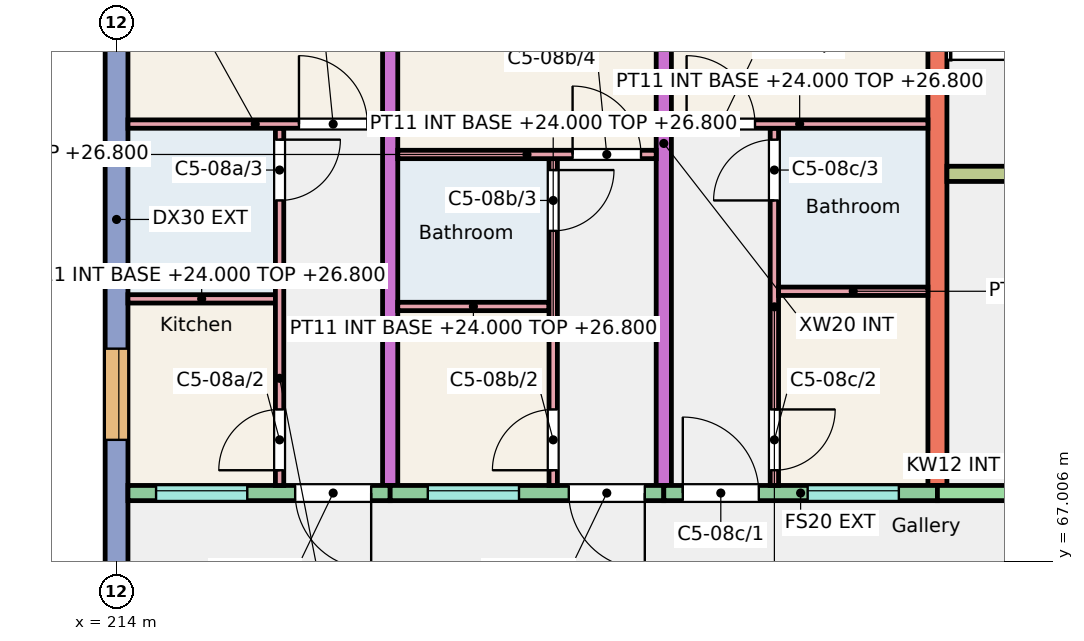
"""IFC4 building model, lengths in metres.
Left out: names, types, materials, properties, quantities, classifications, styles, units other than length and angle.
Written with IfcOpenShell. Run it as: python <this file> out.ifc"""

import sys

from ifc_helpers import new_model, si_unit, direction, frame, frame_2d, origin, place, context, subcontext, project, spatial, rectangle, extrude, element, fill, save


model = new_model("IFC4")
c1 = context("Model", 3, precision=1e-05, world=origin(), true_north=direction((0.0, 1.0)))
c2 = subcontext(c1, "Body", "Model", "MODEL_VIEW")
j1 = project(units=[si_unit("LENGTHUNIT", "METRE"), si_unit("PLANEANGLEUNIT", "RADIAN")], contexts=[c1])
p1 = place(None, origin())
s1 = spatial("IfcSite", under=j1, at=p1, CompositionType="ELEMENT")
p2 = place(p1, origin())
s2 = spatial("IfcBuilding", under=s1, at=p2, CompositionType="ELEMENT")
p3 = place(p2, frame((0.0, 0.0, 24.0)))
s3 = spatial("IfcBuildingStorey", under=s2, at=p3, CompositionType="ELEMENT", Elevation=24.0)
p4 = place(p3, frame((214.0, 66.0, 0.0), z_axis=(0.0, 0.0, 1.0), x_axis=(0.0, 1.0, 0.0)))
e1 = element("IfcWall", 1, at=p4, inside=s3, PredefinedType="SHEAR", context=c2, shape_type="SweptSolid", body=[
    extrude(rectangle(XDim=11.0, YDim=0.3, at=frame_2d((5.5, 0.0))), origin(), (0.0, 0.0, 1.0), 3.0),
])
p5 = place(p4, frame((2.6, 0.0, 0.9)))
e2 = element("IfcOpeningElement", 2, at=p5, cuts=e1, PredefinedType="OPENING", context=c2, shape_type="SweptSolid", body=[
    extrude(rectangle(XDim=1.2, YDim=1.5, at=frame_2d((0.6, 0.75))), frame((0.0, 0.16, 0.0), z_axis=(0.0, -1.0, 0.0), x_axis=(1.0, 0.0, 0.0)), (0.0, 0.0, 1.0), 0.32),
])
p6 = place(p4, frame((8.005, 0.0, 0.9)))
e3 = element("IfcOpeningElement", 3, at=p6, cuts=e1, PredefinedType="OPENING", context=c2, shape_type="SweptSolid", body=[
    extrude(rectangle(XDim=1.8, YDim=1.5, at=frame_2d((0.9, 0.75))), frame((0.0, 0.16, 0.0), z_axis=(0.0, -1.0, 0.0), x_axis=(1.0, 0.0, 0.0)), (0.0, 0.0, 1.0), 0.32),
])
for number, where, z_axis, x_axis in (
    (4, (217.6, 68.0, 0.0), (0.0, 0.0, 1.0), (0.0, 1.0, 0.0)),
    (5, (221.2, 68.0, 0.0), (0.0, 0.0, 1.0), (0.0, 1.0, 0.0)),
):
    element("IfcWall", number, at=place(p3, frame(where, z_axis=z_axis, x_axis=x_axis)), inside=s3, PredefinedType="SHEAR", context=c2, shape_type="SweptSolid", body=[
        extrude(rectangle(XDim=9.0, YDim=0.2, at=frame_2d((4.5, 0.0))), origin(), (0.0, 0.0, 1.0), 3.0),
    ])
p7 = place(p3, frame((224.8, 68.0, 0.0), z_axis=(0.0, 0.0, 1.0), x_axis=(0.0, 1.0, 0.0)))
e6 = element("IfcWall", 6, at=p7, inside=s3, PredefinedType="SHEAR", context=c2, shape_type="SweptSolid", body=[
    extrude(rectangle(XDim=9.0, YDim=0.25, at=frame_2d((4.5, 0.0))), origin(), (0.0, 0.0, 1.0), 3.0),
])
p8 = place(p3, frame((214.15, 67.9, 0.0), z_axis=(0.0, 0.0, 1.0), x_axis=(1.0, 0.0, 0.0)))
e7 = element("IfcWall", 7, at=p8, inside=s3, PredefinedType="SOLIDWALL", context=c2, shape_type="SweptSolid", body=[
    extrude(rectangle(XDim=3.45, YDim=0.2, at=frame_2d((1.725, 0.0))), origin(), (0.0, 0.0, 1.0), 3.0),
])
p9 = place(p8, frame((0.37, 0.0, 1.1)))
e8 = element("IfcOpeningElement", 8, at=p9, cuts=e7, PredefinedType="OPENING", context=c2, shape_type="SweptSolid", body=[
    extrude(rectangle(XDim=1.2, YDim=1.3, at=frame_2d((0.6, 0.65))), frame((0.0, 0.11, 0.0), z_axis=(0.0, -1.0, 0.0), x_axis=(1.0, 0.0, 0.0)), (0.0, 0.0, 1.0), 0.22),
])
p10 = place(p8, frame((2.2, 0.0, 0.0)))
e9 = element("IfcOpeningElement", 9, at=p10, cuts=e7, PredefinedType="OPENING", context=c2, shape_type="SweptSolid", body=[
    extrude(rectangle(XDim=1.0, YDim=2.1, at=frame_2d((0.5, 1.05))), frame((0.0, 0.11, 0.0), z_axis=(0.0, -1.0, 0.0), x_axis=(1.0, 0.0, 0.0)), (0.0, 0.0, 1.0), 0.22),
])
p11 = place(p3, frame((217.6, 67.9, 0.0), z_axis=(0.0, 0.0, 1.0), x_axis=(1.0, 0.0, 0.0)))
e10 = element("IfcWall", 10, at=p11, inside=s3, PredefinedType="SOLIDWALL", context=c2, shape_type="SweptSolid", body=[
    extrude(rectangle(XDim=3.6, YDim=0.2, at=frame_2d((1.8, 0.0))), origin(), (0.0, 0.0, 1.0), 3.0),
])
p12 = place(p11, frame((0.495, 0.0, 1.1)))
e11 = element("IfcOpeningElement", 11, at=p12, cuts=e10, PredefinedType="OPENING", context=c2, shape_type="SweptSolid", body=[
    extrude(rectangle(XDim=1.2, YDim=1.3, at=frame_2d((0.6, 0.65))), frame((0.0, 0.11, 0.0), z_axis=(0.0, -1.0, 0.0), x_axis=(1.0, 0.0, 0.0)), (0.0, 0.0, 1.0), 0.22),
])
p13 = place(p11, frame((2.35, 0.0, 0.0)))
e12 = element("IfcOpeningElement", 12, at=p13, cuts=e10, PredefinedType="OPENING", context=c2, shape_type="SweptSolid", body=[
    extrude(rectangle(XDim=1.0, YDim=2.1, at=frame_2d((0.5, 1.05))), frame((0.0, 0.11, 0.0), z_axis=(0.0, -1.0, 0.0), x_axis=(1.0, 0.0, 0.0)), (0.0, 0.0, 1.0), 0.22),
])
p14 = place(p3, frame((221.2, 67.9, 0.0), z_axis=(0.0, 0.0, 1.0), x_axis=(1.0, 0.0, 0.0)))
e13 = element("IfcWall", 13, at=p14, inside=s3, PredefinedType="SOLIDWALL", context=c2, shape_type="SweptSolid", body=[
    extrude(rectangle(XDim=3.6, YDim=0.2, at=frame_2d((1.8, 0.0))), origin(), (0.0, 0.0, 1.0), 3.0),
])
p15 = place(p14, frame((1.893, 0.0, 1.1)))
e14 = element("IfcOpeningElement", 14, at=p15, cuts=e13, PredefinedType="OPENING", context=c2, shape_type="SweptSolid", body=[
    extrude(rectangle(XDim=1.2, YDim=1.3, at=frame_2d((0.6, 0.65))), frame((0.0, 0.11, 0.0), z_axis=(0.0, -1.0, 0.0), x_axis=(1.0, 0.0, 0.0)), (0.0, 0.0, 1.0), 0.22),
])
p16 = place(p14, frame((0.25, 0.0, 0.0)))
e15 = element("IfcOpeningElement", 15, at=p16, cuts=e13, PredefinedType="OPENING", context=c2, shape_type="SweptSolid", body=[
    extrude(rectangle(XDim=1.0, YDim=2.1, at=frame_2d((0.5, 1.05))), frame((0.0, 0.11, 0.0), z_axis=(0.0, -1.0, 0.0), x_axis=(1.0, 0.0, 0.0)), (0.0, 0.0, 1.0), 0.22),
])
p17 = place(p3, frame((224.8, 67.9, 0.0), z_axis=(0.0, 0.0, 1.0), x_axis=(1.0, 0.0, 0.0)))
e16 = element("IfcWall", 16, at=p17, inside=s3, PredefinedType="SHEAR", context=c2, shape_type="SweptSolid", body=[
    extrude(rectangle(XDim=5.85, YDim=0.2, at=frame_2d((2.925, 0.0))), origin(), (0.0, 0.0, 1.0), 3.0),
])
p18 = place(p17, frame((2.438, 0.0, 0.0)))
e17 = element("IfcOpeningElement", 17, at=p18, cuts=e16, PredefinedType="OPENING", context=c2, shape_type="SweptSolid", body=[
    extrude(rectangle(XDim=1.1, YDim=2.1, at=frame_2d((0.55, 1.05))), frame((0.0, 0.11, 0.0), z_axis=(0.0, -1.0, 0.0), x_axis=(1.0, 0.0, 0.0)), (0.0, 0.0, 1.0), 0.22),
])
p19 = place(p3, frame((224.925, 72.1, 0.0), z_axis=(0.0, 0.0, 1.0), x_axis=(1.0, 0.0, 0.0)))
e18 = element("IfcWall", 18, at=p19, inside=s3, PredefinedType="SHEAR", context=c2, shape_type="SweptSolid", body=[
    extrude(rectangle(XDim=5.725, YDim=0.2, at=frame_2d((2.862, 0.0))), origin(), (0.0, 0.0, 1.0), 3.0),
])
p20 = place(p19, frame((0.95, 0.0, 0.0)))
e19 = element("IfcOpeningElement", 19, at=p20, cuts=e18, PredefinedType="OPENING", context=c2, shape_type="SweptSolid", body=[
    extrude(rectangle(XDim=1.0, YDim=2.1, at=frame_2d((0.5, 1.05))), frame((0.0, 0.11, 0.0), z_axis=(0.0, -1.0, 0.0), x_axis=(1.0, 0.0, 0.0)), (0.0, 0.0, 1.0), 0.22),
])
p21 = place(p19, frame((3.863, 0.0, 0.0)))
e20 = element("IfcOpeningElement", 20, at=p21, cuts=e18, PredefinedType="OPENING", context=c2, shape_type="SweptSolid", body=[
    extrude(rectangle(XDim=1.1, YDim=2.1, at=frame_2d((0.55, 1.05))), frame((0.0, 0.11, 0.0), z_axis=(0.0, -1.0, 0.0), x_axis=(1.0, 0.0, 0.0)), (0.0, 0.0, 1.0), 0.22),
])
p22 = place(p3, frame((214.15, 70.455, 0.0), z_axis=(0.0, 0.0, 1.0), x_axis=(1.0, 0.0, 0.0)))
e21 = element("IfcWall", 21, at=p22, inside=s3, PredefinedType="PARTITIONING", context=c2, shape_type="SweptSolid", body=[
    extrude(rectangle(XDim=1.94, YDim=0.11, at=frame_2d((0.97, 0.0))), origin(), (0.0, 0.0, 1.0), 2.8),
])
p23 = place(p3, frame((216.145, 68.0, 0.0), z_axis=(0.0, 0.0, 1.0), x_axis=(0.0, 1.0, 0.0)))
e22 = element("IfcWall", 22, at=p23, inside=s3, PredefinedType="PARTITIONING", context=c2, shape_type="SweptSolid", body=[
    extrude(rectangle(XDim=4.7, YDim=0.11, at=frame_2d((2.35, 0.0))), origin(), (0.0, 0.0, 1.0), 2.8),
])
p24 = place(p23, frame((0.2, 0.0, 0.0)))
e23 = element("IfcOpeningElement", 23, at=p24, cuts=e22, PredefinedType="OPENING", context=c2, shape_type="SweptSolid", body=[
    extrude(rectangle(XDim=0.8, YDim=2.1, at=frame_2d((0.4, 1.05))), frame((0.0, 0.065, 0.0), z_axis=(0.0, -1.0, 0.0), x_axis=(1.0, 0.0, 0.0)), (0.0, 0.0, 1.0), 0.13),
])
p25 = place(p23, frame((3.75, 0.0, 0.0)))
e24 = element("IfcOpeningElement", 24, at=p25, cuts=e22, PredefinedType="OPENING", context=c2, shape_type="SweptSolid", body=[
    extrude(rectangle(XDim=0.8, YDim=2.1, at=frame_2d((0.4, 1.05))), frame((0.0, 0.065, 0.0), z_axis=(0.0, -1.0, 0.0), x_axis=(1.0, 0.0, 0.0)), (0.0, 0.0, 1.0), 0.13),
])
p26 = place(p3, frame((214.15, 72.755, 0.0), z_axis=(0.0, 0.0, 1.0), x_axis=(1.0, 0.0, 0.0)))
e25 = element("IfcWall", 25, at=p26, inside=s3, PredefinedType="PARTITIONING", context=c2, shape_type="SweptSolid", body=[
    extrude(rectangle(XDim=3.35, YDim=0.11, at=frame_2d((1.675, 0.0))), origin(), (0.0, 0.0, 1.0), 2.8),
])
p27 = place(p26, frame((2.25, 0.0, 0.0)))
e26 = element("IfcOpeningElement", 26, at=p27, cuts=e25, PredefinedType="OPENING", context=c2, shape_type="SweptSolid", body=[
    extrude(rectangle(XDim=0.9, YDim=2.1, at=frame_2d((0.45, 1.05))), frame((0.0, 0.065, 0.0), z_axis=(0.0, -1.0, 0.0), x_axis=(1.0, 0.0, 0.0)), (0.0, 0.0, 1.0), 0.13),
])
p28 = place(p3, frame((217.7, 70.355, 0.0), z_axis=(0.0, 0.0, 1.0), x_axis=(1.0, 0.0, 0.0)))
e27 = element("IfcWall", 27, at=p28, inside=s3, PredefinedType="PARTITIONING", context=c2, shape_type="SweptSolid", body=[
    extrude(rectangle(XDim=1.99, YDim=0.11, at=frame_2d((0.995, 0.0))), origin(), (0.0, 0.0, 1.0), 2.8),
])
p29 = place(p3, frame((219.745, 68.0, 0.0), z_axis=(0.0, 0.0, 1.0), x_axis=(0.0, 1.0, 0.0)))
e28 = element("IfcWall", 28, at=p29, inside=s3, PredefinedType="PARTITIONING", context=c2, shape_type="SweptSolid", body=[
    extrude(rectangle(XDim=4.3, YDim=0.11, at=frame_2d((2.15, 0.0))), origin(), (0.0, 0.0, 1.0), 2.8),
])
p30 = place(p29, frame((0.2, 0.0, 0.0)))
e29 = element("IfcOpeningElement", 29, at=p30, cuts=e28, PredefinedType="OPENING", context=c2, shape_type="SweptSolid", body=[
    extrude(rectangle(XDim=0.8, YDim=2.1, at=frame_2d((0.4, 1.05))), frame((0.0, 0.065, 0.0), z_axis=(0.0, -1.0, 0.0), x_axis=(1.0, 0.0, 0.0)), (0.0, 0.0, 1.0), 0.13),
])
p31 = place(p29, frame((3.35, 0.0, 0.0)))
e30 = element("IfcOpeningElement", 30, at=p31, cuts=e28, PredefinedType="OPENING", context=c2, shape_type="SweptSolid", body=[
    extrude(rectangle(XDim=0.8, YDim=2.1, at=frame_2d((0.4, 1.05))), frame((0.0, 0.065, 0.0), z_axis=(0.0, -1.0, 0.0), x_axis=(1.0, 0.0, 0.0)), (0.0, 0.0, 1.0), 0.13),
])
p32 = place(p3, frame((217.7, 72.355, 0.0), z_axis=(0.0, 0.0, 1.0), x_axis=(1.0, 0.0, 0.0)))
e31 = element("IfcWall", 31, at=p32, inside=s3, PredefinedType="PARTITIONING", context=c2, shape_type="SweptSolid", body=[
    extrude(rectangle(XDim=3.4, YDim=0.11, at=frame_2d((1.7, 0.0))), origin(), (0.0, 0.0, 1.0), 2.8),
])
p33 = place(p32, frame((2.3, 0.0, 0.0)))
e32 = element("IfcOpeningElement", 32, at=p33, cuts=e31, PredefinedType="OPENING", context=c2, shape_type="SweptSolid", body=[
    extrude(rectangle(XDim=0.9, YDim=2.1, at=frame_2d((0.45, 1.05))), frame((0.0, 0.065, 0.0), z_axis=(0.0, -1.0, 0.0), x_axis=(1.0, 0.0, 0.0)), (0.0, 0.0, 1.0), 0.13),
])
p34 = place(p3, frame((222.655, 68.0, 0.0), z_axis=(0.0, 0.0, 1.0), x_axis=(0.0, 1.0, 0.0)))
e33 = element("IfcWall", 33, at=p34, inside=s3, PredefinedType="PARTITIONING", context=c2, shape_type="SweptSolid", body=[
    extrude(rectangle(XDim=4.7, YDim=0.11, at=frame_2d((2.35, 0.0))), origin(), (0.0, 0.0, 1.0), 2.8),
])
p35 = place(p34, frame((0.2, 0.0, 0.0)))
e34 = element("IfcOpeningElement", 34, at=p35, cuts=e33, PredefinedType="OPENING", context=c2, shape_type="SweptSolid", body=[
    extrude(rectangle(XDim=0.8, YDim=2.1, at=frame_2d((0.4, 1.05))), frame((0.0, 0.065, 0.0), z_axis=(0.0, -1.0, 0.0), x_axis=(1.0, 0.0, 0.0)), (0.0, 0.0, 1.0), 0.13),
])
p36 = place(p34, frame((3.75, 0.0, 0.0)))
e35 = element("IfcOpeningElement", 35, at=p36, cuts=e33, PredefinedType="OPENING", context=c2, shape_type="SweptSolid", body=[
    extrude(rectangle(XDim=0.8, YDim=2.1, at=frame_2d((0.4, 1.05))), frame((0.0, 0.065, 0.0), z_axis=(0.0, -1.0, 0.0), x_axis=(1.0, 0.0, 0.0)), (0.0, 0.0, 1.0), 0.13),
])
p37 = place(p3, frame((222.71, 70.555, 0.0), z_axis=(0.0, 0.0, 1.0), x_axis=(1.0, 0.0, 0.0)))
e36 = element("IfcWall", 36, at=p37, inside=s3, PredefinedType="PARTITIONING", context=c2, shape_type="SweptSolid", body=[
    extrude(rectangle(XDim=1.965, YDim=0.11, at=frame_2d((0.982, 0.0))), origin(), (0.0, 0.0, 1.0), 2.8),
])
p38 = place(p3, frame((221.3, 72.755, 0.0), z_axis=(0.0, 0.0, 1.0), x_axis=(1.0, 0.0, 0.0)))
e37 = element("IfcWall", 37, at=p38, inside=s3, PredefinedType="PARTITIONING", context=c2, shape_type="SweptSolid", body=[
    extrude(rectangle(XDim=3.375, YDim=0.11, at=frame_2d((1.688, 0.0))), origin(), (0.0, 0.0, 1.0), 2.8),
])
p39 = place(p38, frame((0.2, 0.0, 0.0)))
e38 = element("IfcOpeningElement", 38, at=p39, cuts=e37, PredefinedType="OPENING", context=c2, shape_type="SweptSolid", body=[
    extrude(rectangle(XDim=0.9, YDim=2.1, at=frame_2d((0.45, 1.05))), frame((0.0, 0.065, 0.0), z_axis=(0.0, -1.0, 0.0), x_axis=(1.0, 0.0, 0.0)), (0.0, 0.0, 1.0), 0.13),
])
p40 = place(p9, origin())
e39 = element("IfcWindow", 39, at=p40, inside=s3, PartitioningType="SINGLE_PANEL", PredefinedType="WINDOW", context=c2, shape_type="SweptSolid", body=[
    extrude(rectangle(XDim=1.2, YDim=1.3, at=frame_2d((0.6, 0.65))), frame((0.0, 0.06, 0.0), z_axis=(0.0, -1.0, 0.0), x_axis=(1.0, 0.0, 0.0)), (0.0, 0.0, 1.0), 0.06),
])
fill(e8, e39)
p41 = place(p5, origin())
e40 = element("IfcWindow", 40, at=p41, inside=s3, PartitioningType="SINGLE_PANEL", PredefinedType="WINDOW", context=c2, shape_type="SweptSolid", body=[
    extrude(rectangle(XDim=1.2, YDim=1.5, at=frame_2d((0.6, 0.75))), frame((0.0, 0.0, 0.0), z_axis=(0.0, -1.0, 0.0), x_axis=(1.0, 0.0, 0.0)), (0.0, 0.0, 1.0), 0.06),
])
fill(e2, e40)
p42 = place(p12, origin())
e41 = element("IfcWindow", 41, at=p42, inside=s3, PartitioningType="SINGLE_PANEL", PredefinedType="WINDOW", context=c2, shape_type="SweptSolid", body=[
    extrude(rectangle(XDim=1.2, YDim=1.3, at=frame_2d((0.6, 0.65))), frame((0.0, 0.06, 0.0), z_axis=(0.0, -1.0, 0.0), x_axis=(1.0, 0.0, 0.0)), (0.0, 0.0, 1.0), 0.06),
])
fill(e11, e41)
p43 = place(p15, origin())
e42 = element("IfcWindow", 42, at=p43, inside=s3, PartitioningType="SINGLE_PANEL", PredefinedType="WINDOW", context=c2, shape_type="SweptSolid", body=[
    extrude(rectangle(XDim=1.2, YDim=1.3, at=frame_2d((0.6, 0.65))), frame((0.0, 0.06, 0.0), z_axis=(0.0, -1.0, 0.0), x_axis=(1.0, 0.0, 0.0)), (0.0, 0.0, 1.0), 0.06),
])
fill(e14, e42)
p44 = place(p10, origin())
e43 = element("IfcDoor", 43, at=p44, inside=s3, OperationType="SINGLE_SWING_RIGHT", PredefinedType="DOOR", context=c2, shape_type="SweptSolid", body=[
    extrude(rectangle(XDim=1.0, YDim=2.1, at=frame_2d((0.5, 1.05))), frame((0.0, 0.025, 0.0), z_axis=(0.0, -1.0, 0.0), x_axis=(1.0, 0.0, 0.0)), (0.0, 0.0, 1.0), 0.05),
])
fill(e9, e43)
p45 = place(p24, origin())
e44 = element("IfcDoor", 44, at=p45, inside=s3, OperationType="SINGLE_SWING_LEFT", PredefinedType="DOOR", context=c2, shape_type="SweptSolid", body=[
    extrude(rectangle(XDim=0.8, YDim=2.1, at=frame_2d((0.4, 1.05))), frame((0.0, 0.025, 0.0), z_axis=(0.0, -1.0, 0.0), x_axis=(1.0, 0.0, 0.0)), (0.0, 0.0, 1.0), 0.05),
])
fill(e23, e44)
p46 = place(p25, origin())
e45 = element("IfcDoor", 45, at=p46, inside=s3, OperationType="SINGLE_SWING_RIGHT", PredefinedType="DOOR", context=c2, shape_type="SweptSolid", body=[
    extrude(rectangle(XDim=0.8, YDim=2.1, at=frame_2d((0.4, 1.05))), frame((0.0, 0.025, 0.0), z_axis=(0.0, -1.0, 0.0), x_axis=(1.0, 0.0, 0.0)), (0.0, 0.0, 1.0), 0.05),
])
fill(e24, e45)
p47 = place(p27, origin())
e46 = element("IfcDoor", 46, at=p47, inside=s3, OperationType="SINGLE_SWING_LEFT", PredefinedType="DOOR", context=c2, shape_type="SweptSolid", body=[
    extrude(rectangle(XDim=0.9, YDim=2.1, at=frame_2d((0.45, 1.05))), frame((0.0, 0.025, 0.0), z_axis=(0.0, -1.0, 0.0), x_axis=(1.0, 0.0, 0.0)), (0.0, 0.0, 1.0), 0.05),
])
fill(e26, e46)
p48 = place(p13, origin())
e47 = element("IfcDoor", 47, at=p48, inside=s3, OperationType="SINGLE_SWING_RIGHT", PredefinedType="DOOR", context=c2, shape_type="SweptSolid", body=[
    extrude(rectangle(XDim=1.0, YDim=2.1, at=frame_2d((0.5, 1.05))), frame((0.0, 0.025, 0.0), z_axis=(0.0, -1.0, 0.0), x_axis=(1.0, 0.0, 0.0)), (0.0, 0.0, 1.0), 0.05),
])
fill(e12, e47)
p49 = place(p30, origin())
e48 = element("IfcDoor", 48, at=p49, inside=s3, OperationType="SINGLE_SWING_LEFT", PredefinedType="DOOR", context=c2, shape_type="SweptSolid", body=[
    extrude(rectangle(XDim=0.8, YDim=2.1, at=frame_2d((0.4, 1.05))), frame((0.0, 0.025, 0.0), z_axis=(0.0, -1.0, 0.0), x_axis=(1.0, 0.0, 0.0)), (0.0, 0.0, 1.0), 0.05),
])
fill(e29, e48)
p50 = place(p31, origin())
e49 = element("IfcDoor", 49, at=p50, inside=s3, OperationType="SINGLE_SWING_RIGHT", PredefinedType="DOOR", context=c2, shape_type="SweptSolid", body=[
    extrude(rectangle(XDim=0.8, YDim=2.1, at=frame_2d((0.4, 1.05))), frame((0.0, 0.025, 0.0), z_axis=(0.0, -1.0, 0.0), x_axis=(1.0, 0.0, 0.0)), (0.0, 0.0, 1.0), 0.05),
])
fill(e30, e49)
p51 = place(p33, origin())
e50 = element("IfcDoor", 50, at=p51, inside=s3, OperationType="SINGLE_SWING_LEFT", PredefinedType="DOOR", context=c2, shape_type="SweptSolid", body=[
    extrude(rectangle(XDim=0.9, YDim=2.1, at=frame_2d((0.45, 1.05))), frame((0.0, 0.025, 0.0), z_axis=(0.0, -1.0, 0.0), x_axis=(1.0, 0.0, 0.0)), (0.0, 0.0, 1.0), 0.05),
])
fill(e32, e50)
p52 = place(p16, origin())
e51 = element("IfcDoor", 51, at=p52, inside=s3, OperationType="SINGLE_SWING_LEFT", PredefinedType="DOOR", context=c2, shape_type="SweptSolid", body=[
    extrude(rectangle(XDim=1.0, YDim=2.1, at=frame_2d((0.5, 1.05))), frame((0.0, 0.025, 0.0), z_axis=(0.0, -1.0, 0.0), x_axis=(1.0, 0.0, 0.0)), (0.0, 0.0, 1.0), 0.05),
])
fill(e15, e51)
p53 = place(p35, origin())
e52 = element("IfcDoor", 52, at=p53, inside=s3, OperationType="SINGLE_SWING_RIGHT", PredefinedType="DOOR", context=c2, shape_type="SweptSolid", body=[
    extrude(rectangle(XDim=0.8, YDim=2.1, at=frame_2d((0.4, 1.05))), frame((0.0, 0.025, 0.0), z_axis=(0.0, -1.0, 0.0), x_axis=(1.0, 0.0, 0.0)), (0.0, 0.0, 1.0), 0.05),
])
fill(e34, e52)
p54 = place(p36, origin())
e53 = element("IfcDoor", 53, at=p54, inside=s3, OperationType="SINGLE_SWING_LEFT", PredefinedType="DOOR", context=c2, shape_type="SweptSolid", body=[
    extrude(rectangle(XDim=0.8, YDim=2.1, at=frame_2d((0.4, 1.05))), frame((0.0, 0.025, 0.0), z_axis=(0.0, -1.0, 0.0), x_axis=(1.0, 0.0, 0.0)), (0.0, 0.0, 1.0), 0.05),
])
fill(e35, e53)
p55 = place(p39, origin())
e54 = element("IfcDoor", 54, at=p55, inside=s3, OperationType="SINGLE_SWING_LEFT", PredefinedType="DOOR", context=c2, shape_type="SweptSolid", body=[
    extrude(rectangle(XDim=0.9, YDim=2.1, at=frame_2d((0.45, 1.05))), frame((0.0, 0.025, 0.0), z_axis=(0.0, -1.0, 0.0), x_axis=(1.0, 0.0, 0.0)), (0.0, 0.0, 1.0), 0.05),
])
fill(e38, e54)
save(model, sys.argv[1])
